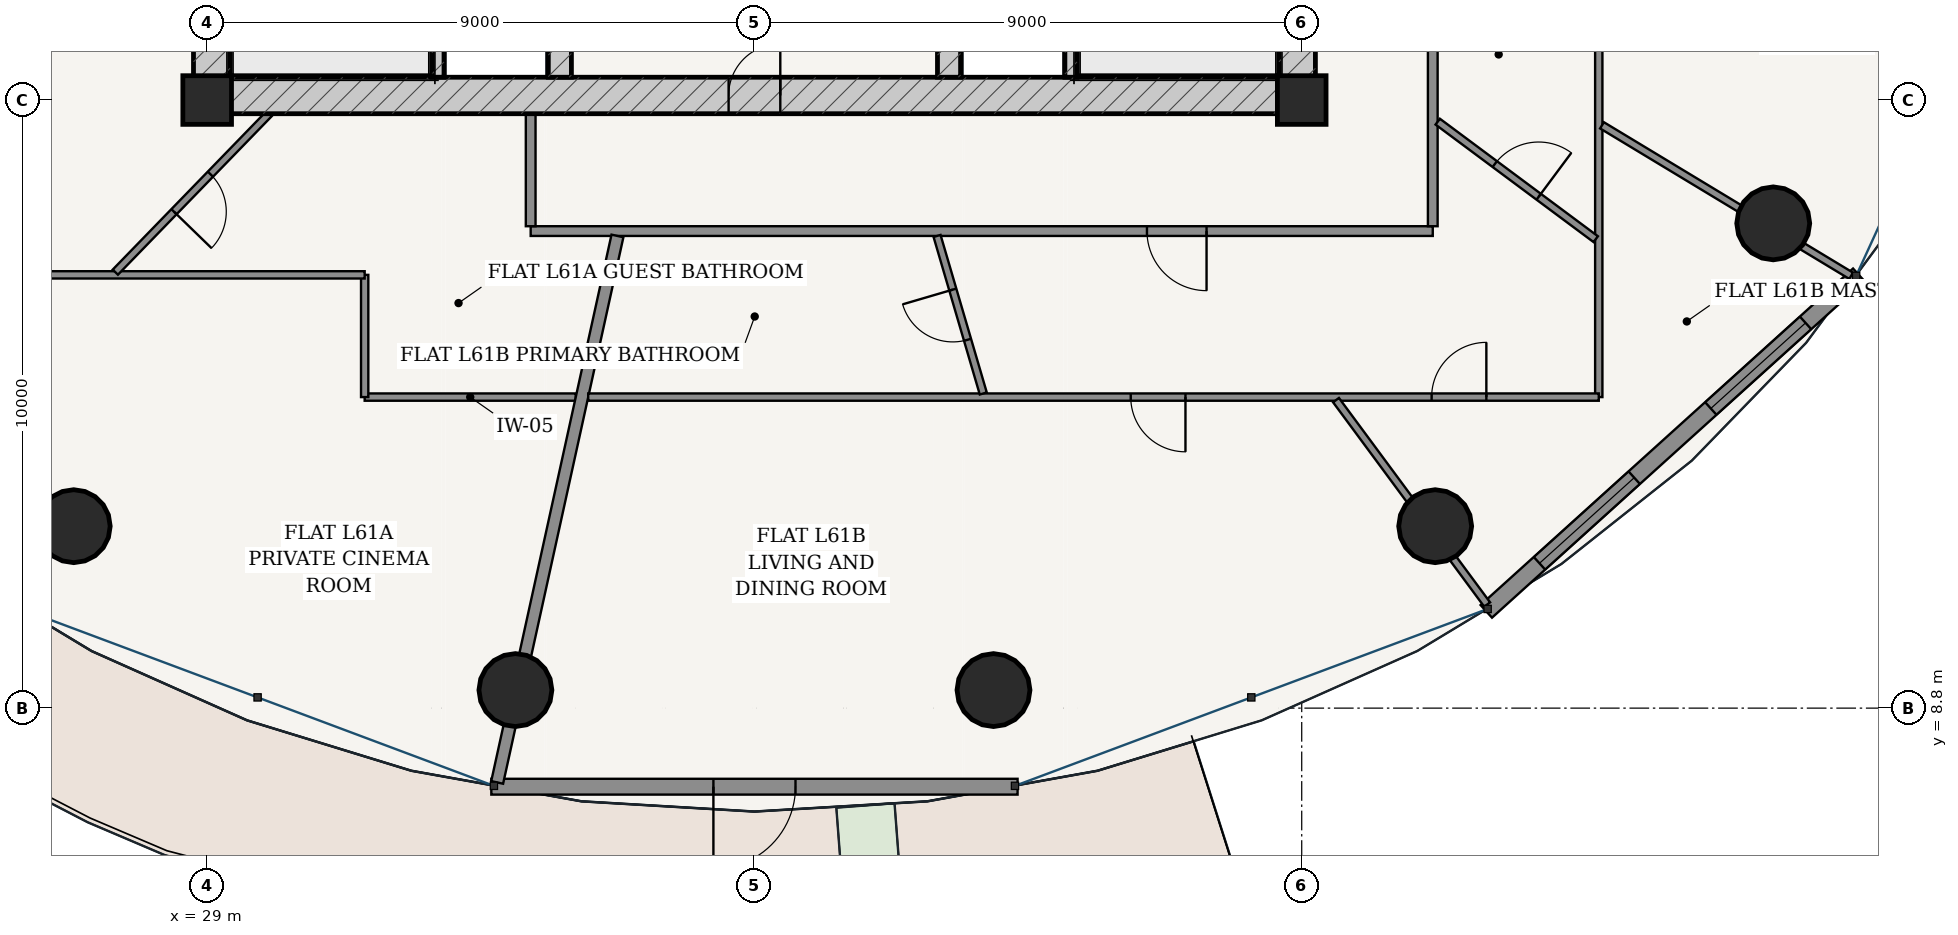
"""IFC4 building model, lengths in metres.
Left out: names, types, materials, properties, quantities, classifications, styles, units other than length and angle.
Written with IfcOpenShell. Run it as: python <this file> out.ifc"""

import sys

from ifc_helpers import new_model, si_unit, direction, frame, frame_2d, origin, origin_2d, place, context, subcontext, project, spatial, rectangle, hollow_circle, extrude, source, transform, mapped, element, fill, save


model = new_model("IFC4")
c1 = context("Model", 3, precision=1e-05, world=origin(), true_north=direction((-0.2419218956, 0.970295726276)))
c2 = subcontext(c1, "Body", "Model", "MODEL_VIEW")
j1 = project(units=[si_unit("LENGTHUNIT", "METRE"), si_unit("PLANEANGLEUNIT", "RADIAN")], contexts=[c1])
p1 = place(None, origin())
s1 = spatial("IfcSite", under=j1, at=p1, CompositionType="ELEMENT")
p2 = place(p1, origin())
s2 = spatial("IfcBuilding", under=s1, at=p2, CompositionType="ELEMENT")
p3 = place(p2, frame((0.0, 0.0, 231.9)))
s3 = spatial("IfcBuildingStorey", under=s2, at=p3, CompositionType="ELEMENT", Elevation=231.9)
for number, where, z_axis, x_axis in (
    (1, (29.0, 18.8, 0.0), (0.0, 0.0, 1.0), (1.0, 0.0, 0.0)),
    (2, (47.0, 18.8, 0.0), (0.0, 0.0, 1.0), (1.0, 0.0, 0.0)),
):
    element("IfcColumn", number, at=place(p3, frame(where, z_axis=z_axis, x_axis=x_axis)), inside=s3, PredefinedType="COLUMN", context=c2, shape_type="SweptSolid", body=[
        extrude(rectangle(XDim=0.8, YDim=0.8, at=origin_2d()), origin(), (0.0, 0.0, 1.0), 3.7),
    ])
p4 = place(p3, frame((28.775, 18.875, 0.0), z_axis=(0.0, 0.0, 1.0), x_axis=(1.0, 0.0, 0.0)))
e3 = element("IfcWall", 3, at=p4, inside=s3, PredefinedType="SHEAR", context=c2, shape_type="SweptSolid", body=[
    extrude(rectangle(XDim=18.45, YDim=0.6, at=frame_2d((9.225, 0.0))), origin(), (0.0, 0.0, 1.0), 3.435),
])
p5 = place(p4, frame((8.8, 0.0, 0.0)))
e4 = element("IfcOpeningElement", 4, at=p5, cuts=e3, PredefinedType="OPENING", context=c2, shape_type="SweptSolid", body=[
    extrude(rectangle(XDim=0.85, YDim=2.1, at=frame_2d((0.425, 1.05))), frame((0.0, 0.31, 0.0), z_axis=(0.0, -1.0, 0.0), x_axis=(1.0, 0.0, 0.0)), (0.0, 0.0, 1.0), 0.62),
])
p6 = place(p3, frame((29.075, 19.175, 0.0), z_axis=(0.0, 0.0, 1.0), x_axis=(0.0, 1.0, 0.0)))
e5 = element("IfcWall", 5, at=p6, inside=s3, PredefinedType="SHEAR", context=c2, shape_type="SweptSolid", body=[
    extrude(rectangle(XDim=15.25, YDim=0.6, at=frame_2d((7.625, 0.0))), origin(), (0.0, 0.0, 1.0), 3.435),
])
p7 = place(p6, frame((9.875, 0.0, 0.0)))
e6 = element("IfcOpeningElement", 6, at=p7, cuts=e5, PredefinedType="OPENING", context=c2, shape_type="SweptSolid", body=[
    extrude(rectangle(XDim=1.5, YDim=2.2, at=frame_2d((0.75, 1.1))), frame((0.0, 0.31, 0.0), z_axis=(0.0, -1.0, 0.0), x_axis=(1.0, 0.0, 0.0)), (0.0, 0.0, 1.0), 0.62),
])
p8 = place(p3, frame((46.925, 19.175, 0.0), z_axis=(0.0, 0.0, 1.0), x_axis=(0.0, 1.0, 0.0)))
e7 = element("IfcWall", 7, at=p8, inside=s3, PredefinedType="SHEAR", context=c2, shape_type="SweptSolid", body=[
    extrude(rectangle(XDim=15.25, YDim=0.6, at=frame_2d((7.625, 0.0))), origin(), (0.0, 0.0, 1.0), 3.435),
])
p9 = place(p8, frame((9.875, 0.0, 0.0)))
e8 = element("IfcOpeningElement", 8, at=p9, cuts=e7, PredefinedType="OPENING", context=c2, shape_type="SweptSolid", body=[
    extrude(rectangle(XDim=1.5, YDim=2.2, at=frame_2d((0.75, 1.1))), frame((0.0, 0.31, 0.0), z_axis=(0.0, -1.0, 0.0), x_axis=(1.0, 0.0, 0.0)), (0.0, 0.0, 1.0), 0.62),
])
for number, where, z_axis, x_axis in (
    (9, (32.795, 19.175, 0.0), (0.0, 0.0, 1.0), (0.0, 1.0, 0.0)),
    (10, (43.205, 19.175, 0.0), (0.0, 0.0, 1.0), (0.0, 1.0, 0.0)),
):
    element("IfcWall", number, at=place(p3, frame(where, z_axis=z_axis, x_axis=x_axis)), inside=s3, PredefinedType="SOLIDWALL", context=c2, shape_type="SweptSolid", body=[
        extrude(rectangle(XDim=7.375, YDim=0.2, at=frame_2d((3.688, 0.0))), origin(), (0.0, 0.0, 1.0), 3.435),
    ])
p10 = place(p3, frame((34.8, 19.175, 0.0), z_axis=(0.0, 0.0, 1.0), x_axis=(0.0, 1.0, 0.0)))
e11 = element("IfcWall", 11, at=p10, inside=s3, PredefinedType="SHEAR", context=c2, shape_type="SweptSolid", body=[
    extrude(rectangle(XDim=15.25, YDim=0.38, at=frame_2d((7.625, 0.0))), origin(), (0.0, 0.0, 1.0), 3.435),
])
p11 = place(p10, frame((7.8, 0.0, 0.0)))
e12 = element("IfcOpeningElement", 12, at=p11, cuts=e11, PredefinedType="OPENING", context=c2, shape_type="SweptSolid", body=[
    extrude(rectangle(XDim=1.05, YDim=2.15, at=frame_2d((0.525, 1.075))), frame((0.0, 0.2, 0.0), z_axis=(0.0, -1.0, 0.0), x_axis=(1.0, 0.0, 0.0)), (0.0, 0.0, 1.0), 0.4),
])
p12 = place(p3, frame((41.2, 19.175, 0.0), z_axis=(0.0, 0.0, 1.0), x_axis=(0.0, 1.0, 0.0)))
e13 = element("IfcWall", 13, at=p12, inside=s3, PredefinedType="SHEAR", context=c2, shape_type="SweptSolid", body=[
    extrude(rectangle(XDim=15.25, YDim=0.38, at=frame_2d((7.625, 0.0))), origin(), (0.0, 0.0, 1.0), 3.435),
])
p13 = place(p12, frame((7.8, 0.0, 0.0)))
e14 = element("IfcOpeningElement", 14, at=p13, cuts=e13, PredefinedType="OPENING", context=c2, shape_type="SweptSolid", body=[
    extrude(rectangle(XDim=1.05, YDim=2.15, at=frame_2d((0.525, 1.075))), frame((0.0, 0.2, 0.0), z_axis=(0.0, -1.0, 0.0), x_axis=(1.0, 0.0, 0.0)), (0.0, 0.0, 1.0), 0.4),
])
for number, where, z_axis, x_axis in (
    (15, (26.805, 11.792, 0.0), (0.0, 0.0, 1.0), (1.0, 0.0, 0.0)),
    (16, (34.069, 9.097, 0.0), (0.0, 0.0, 1.0), (1.0, 0.0, 0.0)),
    (17, (41.931, 9.097, 0.0), (0.0, 0.0, 1.0), (1.0, 0.0, 0.0)),
    (18, (49.195, 11.792, 0.0), (0.0, 0.0, 1.0), (1.0, 0.0, 0.0)),
    (19, (54.754, 16.772, 0.0), (0.0, 0.0, 1.0), (1.0, 0.0, 0.0)),
):
    element("IfcColumn", number, at=place(p3, frame(where, z_axis=z_axis, x_axis=x_axis)), inside=s3, PredefinedType="COLUMN", context=c2, shape_type="SweptSolid", body=[
        extrude(hollow_circle(Radius=0.6, WallThickness=0.038, at=origin_2d()), origin(), (0.0, 0.0, 1.0), 3.7),
    ])
p14 = place(p3, frame((33.673, 7.508, 0.0), z_axis=(0.0, 0.0, 1.0), x_axis=(1.0, 0.0, 0.0)))
e20 = element("IfcWall", 20, at=p14, inside=s3, PredefinedType="SOLIDWALL", context=c2, shape_type="SweptSolid", body=[
    extrude(rectangle(XDim=8.654, YDim=0.26, at=frame_2d((4.327, 0.0))), origin(), (0.0, 0.0, 1.0), 3.435),
])
p15 = place(p14, frame((3.652, 0.0, 0.0)))
e21 = element("IfcOpeningElement", 21, at=p15, cuts=e20, PredefinedType="OPENING", context=c2, shape_type="SweptSolid", body=[
    extrude(rectangle(XDim=1.35, YDim=2.2, at=frame_2d((0.675, 1.1))), frame((0.0, 0.14, 0.0), z_axis=(0.0, -1.0, 0.0), x_axis=(1.0, 0.0, 0.0)), (0.0, 0.0, 1.0), 0.28),
])
p16 = place(p3, frame((50.035, 10.391, 0.0), z_axis=(0.0, 0.0, 1.0), x_axis=(0.741986838603, 0.670414447443, 0.0)))
e22 = element("IfcWall", 22, at=p16, inside=s3, PredefinedType="SOLIDWALL", context=c2, shape_type="SweptSolid", body=[
    extrude(rectangle(XDim=8.255, YDim=0.28, at=frame_2d((4.127, 0.0))), origin(), (0.0, 0.0, 1.0), 3.435),
])
p17 = place(p16, frame((1.179, 0.0, 0.85)))
e23 = element("IfcOpeningElement", 23, at=p17, cuts=e22, PredefinedType="OPENING", context=c2, shape_type="SweptSolid", body=[
    extrude(rectangle(XDim=2.1, YDim=1.95, at=frame_2d((1.05, 0.975))), frame((0.0, 0.15, 0.0), z_axis=(0.0, -1.0, 0.0), x_axis=(1.0, 0.0, 0.0)), (0.0, 0.0, 1.0), 0.3),
])
p18 = place(p16, frame((4.976, 0.0, 0.85)))
e24 = element("IfcOpeningElement", 24, at=p18, cuts=e22, PredefinedType="OPENING", context=c2, shape_type="SweptSolid", body=[
    extrude(rectangle(XDim=2.1, YDim=1.95, at=frame_2d((1.05, 0.975))), frame((0.0, 0.15, 0.0), z_axis=(0.0, -1.0, 0.0), x_axis=(1.0, 0.0, 0.0)), (0.0, 0.0, 1.0), 0.3),
])
p19 = place(p3, frame((34.32, 16.645, 0.0), z_axis=(0.0, 0.0, 1.0), x_axis=(1.0, 0.0, 0.0)))
e25 = element("IfcWall", 25, at=p19, inside=s3, PredefinedType="PARTITIONING", context=c2, shape_type="SweptSolid", body=[
    extrude(rectangle(XDim=14.835, YDim=0.16, at=frame_2d((7.417, 0.0))), origin(), (0.0, 0.0, 1.0), 2.951),
])
p20 = place(p19, frame((10.135, 0.0, 0.0)))
e26 = element("IfcOpeningElement", 26, at=p20, cuts=e25, PredefinedType="OPENING", context=c2, shape_type="SweptSolid", body=[
    extrude(rectangle(XDim=0.98, YDim=2.2, at=frame_2d((0.49, 1.1))), frame((0.0, 0.09, 0.0), z_axis=(0.0, -1.0, 0.0), x_axis=(1.0, 0.0, 0.0)), (0.0, 0.0, 1.0), 0.18),
])
p21 = place(p3, frame((34.32, 16.725, 0.0), z_axis=(0.0, 0.0, 1.0), x_axis=(0.0, 1.0, 0.0)))
e27 = element("IfcWall", 27, at=p21, inside=s3, PredefinedType="PARTITIONING", context=c2, shape_type="SweptSolid", body=[
    extrude(rectangle(XDim=1.85, YDim=0.16, at=frame_2d((0.925, 0.0))), origin(), (0.0, 0.0, 1.0), 3.435),
])
p22 = place(p3, frame((49.155, 16.725, 0.0), z_axis=(0.0, 0.0, 1.0), x_axis=(0.0, 1.0, 0.0)))
e28 = element("IfcWall", 28, at=p22, inside=s3, PredefinedType="PARTITIONING", context=c2, shape_type="SweptSolid", body=[
    extrude(rectangle(XDim=18.3, YDim=0.16, at=frame_2d((9.15, 0.0))), origin(), (0.0, 0.0, 1.0), 2.951),
])
p23 = place(p3, frame((35.062, 13.915, 0.0), z_axis=(0.0, 0.0, 1.0), x_axis=(-1.0, 0.0, 0.0)))
e29 = element("IfcWall", 29, at=p23, inside=s3, PredefinedType="PARTITIONING", context=c2, shape_type="SweptSolid", body=[
    extrude(rectangle(XDim=3.472, YDim=0.12, at=frame_2d((1.736, 0.0))), origin(), (0.0, 0.0, 1.0), 2.951),
])
p24 = place(p3, frame((31.59, 13.915, 0.0), z_axis=(0.0, 0.0, 1.0), x_axis=(0.0, 1.0, 0.0)))
e30 = element("IfcWall", 30, at=p24, inside=s3, PredefinedType="PARTITIONING", context=c2, shape_type="SweptSolid", body=[
    extrude(rectangle(XDim=2.01, YDim=0.12, at=frame_2d((1.005, 0.0))), origin(), (0.0, 0.0, 1.0), 3.11),
])
p25 = place(p3, frame((31.59, 15.925, 0.0), z_axis=(0.0, 0.0, 1.0), x_axis=(-1.0, 0.0, 0.0)))
e31 = element("IfcWall", 31, at=p25, inside=s3, PredefinedType="PARTITIONING", context=c2, shape_type="SweptSolid", body=[
    extrude(rectangle(XDim=5.465, YDim=0.12, at=frame_2d((2.732, 0.0))), origin(), (0.0, 0.0, 1.0), 2.951),
])
p26 = place(p3, frame((30.018, 18.575, 0.0), z_axis=(0.0, 0.0, 1.0), x_axis=(-0.696436677683, -0.717618250867, 0.0)))
e32 = element("IfcWall", 32, at=p26, inside=s3, PredefinedType="PARTITIONING", context=c2, shape_type="SweptSolid", body=[
    extrude(rectangle(XDim=3.631, YDim=0.12, at=frame_2d((1.815, 0.0))), origin(), (0.0, 0.0, 1.0), 2.951),
])
p27 = place(p26, frame((1.385, 0.0, 0.0)))
e33 = element("IfcOpeningElement", 33, at=p27, cuts=e32, PredefinedType="OPENING", context=c2, shape_type="SweptSolid", body=[
    extrude(rectangle(XDim=0.86, YDim=2.15, at=frame_2d((0.43, 1.075))), frame((0.0, 0.07, 0.0), z_axis=(0.0, -1.0, 0.0), x_axis=(1.0, 0.0, 0.0)), (0.0, 0.0, 1.0), 0.14),
])
p28 = place(p3, frame((35.747, 16.565, 0.0), z_axis=(0.0, 0.0, 1.0), x_axis=(-0.214957946814, -0.976623305631, 0.0)))
e34 = element("IfcWall", 34, at=p28, inside=s3, PredefinedType="PARTITIONING", context=c2, shape_type="SweptSolid", body=[
    extrude(rectangle(XDim=9.202, YDim=0.2, at=frame_2d((4.601, 0.0))), origin(), (0.0, 0.0, 1.0), 2.951),
])
p29 = place(p3, frame((51.885, 37.835, 0.0), z_axis=(0.0, 0.0, 1.0), x_axis=(0.0, -1.0, 0.0)))
e35 = element("IfcWall", 35, at=p29, inside=s3, PredefinedType="PARTITIONING", context=c2, shape_type="SweptSolid", body=[
    extrude(rectangle(XDim=23.92, YDim=0.12, at=frame_2d((11.96, 0.0))), origin(), (0.0, 0.0, 1.0), 2.951),
])
p30 = place(p29, frame((16.558, 0.0, 0.0)))
e36 = element("IfcOpeningElement", 36, at=p30, cuts=e35, PredefinedType="OPENING", context=c2, shape_type="SweptSolid", body=[
    extrude(rectangle(XDim=0.9, YDim=2.15, at=frame_2d((0.45, 1.075))), frame((0.0, 0.07, 0.0), z_axis=(0.0, -1.0, 0.0), x_axis=(1.0, 0.0, 0.0)), (0.0, 0.0, 1.0), 0.14),
])
p31 = place(p3, frame((51.885, 13.915, 0.0), z_axis=(0.0, 0.0, 1.0), x_axis=(-1.0, 0.0, 0.0)))
e37 = element("IfcWall", 37, at=p31, inside=s3, PredefinedType="PARTITIONING", context=c2, shape_type="SweptSolid", body=[
    extrude(rectangle(XDim=16.619, YDim=0.12, at=frame_2d((8.31, 0.0))), origin(), (0.0, 0.0, 1.0), 2.951),
])
p32 = place(p31, frame((6.797, 0.0, 0.0)))
e38 = element("IfcOpeningElement", 38, at=p32, cuts=e37, PredefinedType="OPENING", context=c2, shape_type="SweptSolid", body=[
    extrude(rectangle(XDim=0.9, YDim=2.15, at=frame_2d((0.45, 1.075))), frame((0.0, 0.07, 0.0), z_axis=(0.0, -1.0, 0.0), x_axis=(1.0, 0.0, 0.0)), (0.0, 0.0, 1.0), 0.14),
])
p33 = place(p31, frame((1.849, 0.0, 0.0)))
e39 = element("IfcOpeningElement", 39, at=p33, cuts=e37, PredefinedType="OPENING", context=c2, shape_type="SweptSolid", body=[
    extrude(rectangle(XDim=0.9, YDim=2.15, at=frame_2d((0.45, 1.075))), frame((0.0, 0.07, 0.0), z_axis=(0.0, -1.0, 0.0), x_axis=(1.0, 0.0, 0.0)), (0.0, 0.0, 1.0), 0.14),
])
p34 = place(p3, frame((47.564, 13.865, 0.0), z_axis=(0.0, 0.0, 1.0), x_axis=(0.594501071103, -0.804094818076, 0.0)))
e40 = element("IfcWall", 40, at=p34, inside=s3, PredefinedType="PARTITIONING", context=c2, shape_type="SweptSolid", body=[
    extrude(rectangle(XDim=4.181, YDim=0.12, at=frame_2d((2.09, 0.0))), origin(), (0.0, 0.0, 1.0), 2.951),
])
p35 = place(p3, frame((51.938, 18.384, 0.0), z_axis=(0.0, 0.0, 1.0), x_axis=(0.856058483833, -0.516878972543, 0.0)))
e41 = element("IfcWall", 41, at=p35, inside=s3, PredefinedType="PARTITIONING", context=c2, shape_type="SweptSolid", body=[
    extrude(rectangle(XDim=4.787, YDim=0.12, at=frame_2d((2.393, 0.0))), origin(), (0.0, 0.0, 1.0), 2.951),
])
p36 = place(p3, frame((41.003, 16.565, 0.0), z_axis=(0.0, 0.0, 1.0), x_axis=(0.281617901256, -0.959526632091, 0.0)))
e42 = element("IfcWall", 42, at=p36, inside=s3, PredefinedType="PARTITIONING", context=c2, shape_type="SweptSolid", body=[
    extrude(rectangle(XDim=2.7, YDim=0.12, at=frame_2d((1.35, 0.0))), origin(), (0.0, 0.0, 1.0), 3.11),
])
p37 = place(p36, frame((0.92, 0.0, 0.0)))
e43 = element("IfcOpeningElement", 43, at=p37, cuts=e42, PredefinedType="OPENING", context=c2, shape_type="SweptSolid", body=[
    extrude(rectangle(XDim=0.86, YDim=2.15, at=frame_2d((0.43, 1.075))), frame((0.0, 0.07, 0.0), z_axis=(0.0, -1.0, 0.0), x_axis=(1.0, 0.0, 0.0)), (0.0, 0.0, 1.0), 0.14),
])
p38 = place(p3, frame((49.237, 18.444, 0.0), z_axis=(0.0, 0.0, 1.0), x_axis=(0.802454010275, -0.596713969497, 0.0)))
e44 = element("IfcWall", 44, at=p38, inside=s3, PredefinedType="PARTITIONING", context=c2, shape_type="SweptSolid", body=[
    extrude(rectangle(XDim=3.238, YDim=0.12, at=frame_2d((1.619, 0.0))), origin(), (0.0, 0.0, 1.0), 3.11),
])
p39 = place(p38, frame((1.169, 0.0, 0.0)))
e45 = element("IfcOpeningElement", 45, at=p39, cuts=e44, PredefinedType="OPENING", context=c2, shape_type="SweptSolid", body=[
    extrude(rectangle(XDim=0.9, YDim=2.15, at=frame_2d((0.45, 1.075))), frame((0.0, 0.07, 0.0), z_axis=(0.0, -1.0, 0.0), x_axis=(1.0, 0.0, 0.0)), (0.0, 0.0, 1.0), 0.14),
])
m1 = source(origin(), c2, "Body", "SweptSolid", [
    extrude(rectangle(XDim=1.35, YDim=2.2, at=frame_2d((0.675, 1.1))), frame((0.0, 0.025, 0.0), z_axis=(0.0, -1.0, 0.0), x_axis=(1.0, 0.0, 0.0)), (0.0, 0.0, 1.0), 0.05),
])
p40 = place(p15, frame((1.35, 0.0, 0.0), z_axis=(0.0, 0.0, 1.0), x_axis=(-1.0, 0.0, 0.0)))
e46 = element("IfcDoor", 46, at=p40, inside=s3, OperationType="SINGLE_SWING_RIGHT", PredefinedType="DOOR", context=c2, shape_type="MappedRepresentation", body=[
    mapped(m1, transform((0.0, 0.0, 0.0), scale=1.0)),
])
fill(e21, e46)
m2 = source(origin(), c2, "Body", "SweptSolid", [
    extrude(rectangle(XDim=2.1, YDim=1.95, at=frame_2d((1.05, 0.975))), frame((0.0, 0.03, 0.0), z_axis=(0.0, -1.0, 0.0), x_axis=(1.0, 0.0, 0.0)), (0.0, 0.0, 1.0), 0.06),
])
p41 = place(p17, origin())
e47 = element("IfcWindow", 47, at=p41, inside=s3, PartitioningType="SINGLE_PANEL", PredefinedType="WINDOW", context=c2, shape_type="MappedRepresentation", body=[
    mapped(m2, transform((0.0, 0.0, 0.0), scale=1.0)),
])
fill(e23, e47)
p42 = place(p18, origin())
e48 = element("IfcWindow", 48, at=p42, inside=s3, PartitioningType="SINGLE_PANEL", PredefinedType="WINDOW", context=c2, shape_type="MappedRepresentation", body=[
    mapped(m2, transform((0.0, 0.0, 0.0), scale=1.0)),
])
fill(e24, e48)
m3 = source(origin(), c2, "Body", "SweptSolid", [
    extrude(rectangle(XDim=0.85, YDim=2.1, at=frame_2d((0.425, 1.05))), frame((0.0, 0.025, 0.0), z_axis=(0.0, -1.0, 0.0), x_axis=(1.0, 0.0, 0.0)), (0.0, 0.0, 1.0), 0.05),
])
p43 = place(p5, origin())
e49 = element("IfcDoor", 49, at=p43, inside=s3, OperationType="SINGLE_SWING_RIGHT", PredefinedType="DOOR", context=c2, shape_type="MappedRepresentation", body=[
    mapped(m3, transform((0.0, 0.0, 0.0), scale=1.0)),
])
fill(e4, e49)
m4 = source(origin(), c2, "Body", "SweptSolid", [
    extrude(rectangle(XDim=0.86, YDim=2.15, at=frame_2d((0.43, 1.075))), frame((0.0, 0.025, 0.0), z_axis=(0.0, -1.0, 0.0), x_axis=(1.0, 0.0, 0.0)), (0.0, 0.0, 1.0), 0.05),
])
p44 = place(p27, origin())
e50 = element("IfcDoor", 50, at=p44, inside=s3, OperationType="SINGLE_SWING_RIGHT", PredefinedType="DOOR", context=c2, shape_type="MappedRepresentation", body=[
    mapped(m4, transform((0.0, 0.0, 0.0), scale=1.0)),
])
fill(e33, e50)
m5 = source(origin(), c2, "Body", "SweptSolid", [
    extrude(rectangle(XDim=0.98, YDim=2.2, at=frame_2d((0.49, 1.1))), frame((0.0, 0.025, 0.0), z_axis=(0.0, -1.0, 0.0), x_axis=(1.0, 0.0, 0.0)), (0.0, 0.0, 1.0), 0.05),
])
p45 = place(p20, frame((0.98, 0.0, 0.0), z_axis=(0.0, 0.0, 1.0), x_axis=(-1.0, 0.0, 0.0)))
e51 = element("IfcDoor", 51, at=p45, inside=s3, OperationType="SINGLE_SWING_LEFT", PredefinedType="DOOR", context=c2, shape_type="MappedRepresentation", body=[
    mapped(m5, transform((0.0, 0.0, 0.0), scale=1.0)),
])
fill(e26, e51)
p46 = place(p37, frame((0.86, 0.0, 0.0), z_axis=(0.0, 0.0, 1.0), x_axis=(-1.0, 0.0, 0.0)))
e52 = element("IfcDoor", 52, at=p46, inside=s3, OperationType="SINGLE_SWING_RIGHT", PredefinedType="DOOR", context=c2, shape_type="MappedRepresentation", body=[
    mapped(m4, transform((0.0, 0.0, 0.0), scale=1.0)),
])
fill(e43, e52)
m6 = source(origin(), c2, "Body", "SweptSolid", [
    extrude(rectangle(XDim=0.9, YDim=2.15, at=frame_2d((0.45, 1.075))), frame((0.0, 0.025, 0.0), z_axis=(0.0, -1.0, 0.0), x_axis=(1.0, 0.0, 0.0)), (0.0, 0.0, 1.0), 0.05),
])
p47 = place(p32, origin())
e53 = element("IfcDoor", 53, at=p47, inside=s3, OperationType="SINGLE_SWING_LEFT", PredefinedType="DOOR", context=c2, shape_type="MappedRepresentation", body=[
    mapped(m6, transform((0.0, 0.0, 0.0), scale=1.0)),
])
fill(e38, e53)
p48 = place(p39, origin())
e54 = element("IfcDoor", 54, at=p48, inside=s3, OperationType="SINGLE_SWING_RIGHT", PredefinedType="DOOR", context=c2, shape_type="MappedRepresentation", body=[
    mapped(m6, transform((0.0, 0.0, 0.0), scale=1.0)),
])
fill(e45, e54)
p49 = place(p33, frame((0.9, 0.0, 0.0), z_axis=(0.0, 0.0, 1.0), x_axis=(-1.0, 0.0, 0.0)))
e55 = element("IfcDoor", 55, at=p49, inside=s3, OperationType="SINGLE_SWING_RIGHT", PredefinedType="DOOR", context=c2, shape_type="MappedRepresentation", body=[
    mapped(m6, transform((0.0, 0.0, 0.0), scale=1.0)),
])
fill(e39, e55)
save(model, sys.argv[1])
